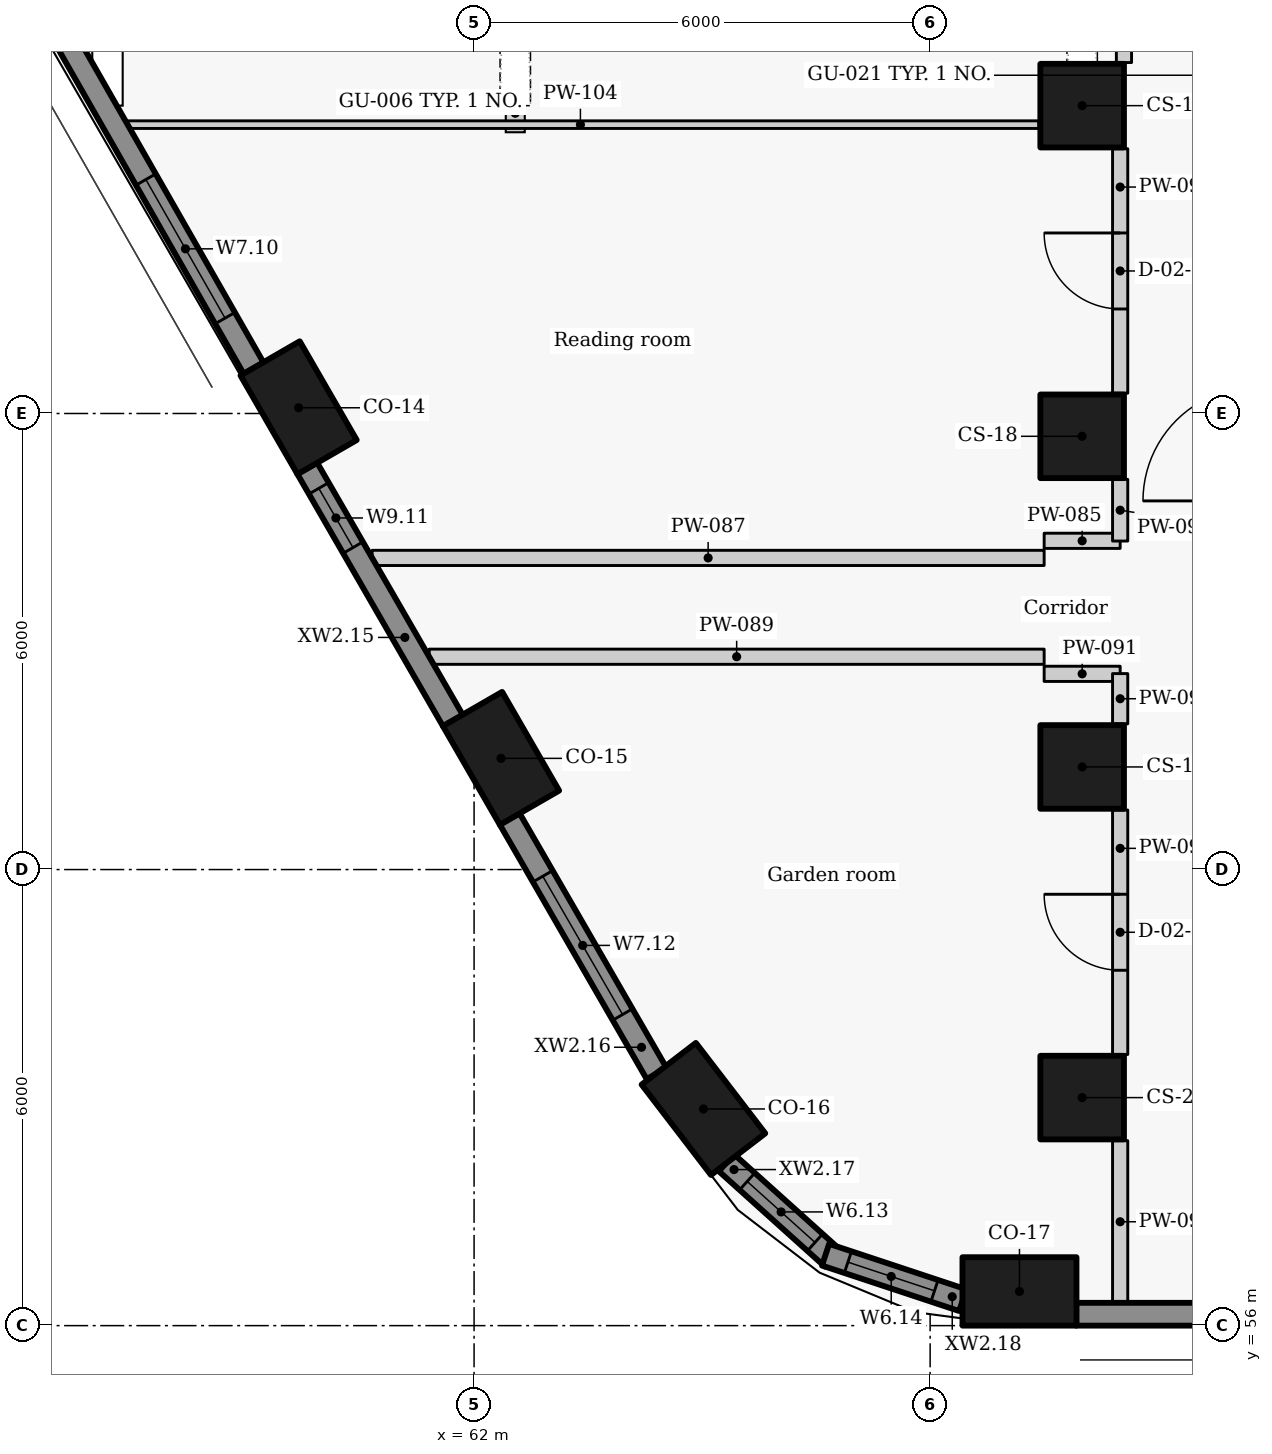
"""IFC4 building model, lengths in metres.
Left out: names, types, materials, properties, quantities, classifications, styles, units other than length and angle.
Written with IfcOpenShell. Run it as: python <this file> out.ifc"""

import sys

from ifc_helpers import new_model, si_unit, direction, frame, frame_2d, origin, origin_2d, place, context, subcontext, project, spatial, rectangle, extrude, element, fill, save


model = new_model("IFC4")
c1 = context("Model", 3, precision=1e-05, world=origin(), true_north=direction((0.0, 1.0)))
c2 = subcontext(c1, "Body", "Model", "MODEL_VIEW")
j1 = project(units=[si_unit("LENGTHUNIT", "METRE"), si_unit("PLANEANGLEUNIT", "RADIAN")], contexts=[c1])
p1 = place(None, origin())
s1 = spatial("IfcSite", under=j1, at=p1, CompositionType="ELEMENT")
p2 = place(p1, origin())
s2 = spatial("IfcBuilding", under=s1, at=p2, CompositionType="ELEMENT")
p3 = place(p2, frame((0.0, 0.0, 38.1)))
s3 = spatial("IfcBuildingStorey", under=s2, at=p3, CompositionType="ELEMENT", Elevation=38.1)
for number, where, z_axis, x_axis in (
    (1, (59.692, 68.075, 0.0), (0.0, 0.0, 1.0), (0.5, -0.866, 0.0)),
    (2, (62.354, 63.463, 0.0), (0.0, 0.0, 1.0), (0.5, -0.866, 0.0)),
    (3, (65.018, 58.851, 0.0), (0.0, 0.0, 1.0), (0.609, -0.793, 0.0)),
    (4, (69.175, 56.45, 0.0), (0.0, 0.0, 1.0), (1.0, 0.0, 0.0)),
):
    element("IfcColumn", number, at=place(p3, frame(where, z_axis=z_axis, x_axis=x_axis)), inside=s3, PredefinedType="COLUMN", context=c2, shape_type="SweptSolid", body=[
        extrude(rectangle(XDim=1.5, YDim=0.9, at=origin_2d()), origin(), (0.0, 0.0, 1.0), 3.3),
    ])
for number, where, z_axis, x_axis in (
    (5, (70.0, 72.05, 0.0), (0.0, 0.0, 1.0), (0.0, -1.0, 0.0)),
    (6, (70.0, 67.7, 0.0), (0.0, 0.0, 1.0), (0.0, -1.0, 0.0)),
    (7, (70.0, 63.35, 0.0), (0.0, 0.0, 1.0), (0.0, -1.0, 0.0)),
    (8, (70.0, 59.0, 0.0), (0.0, 0.0, 1.0), (0.0, -1.0, 0.0)),
):
    element("IfcColumn", number, at=place(p3, frame(where, z_axis=z_axis, x_axis=x_axis)), inside=s3, PredefinedType="COLUMN", context=c2, shape_type="SweptSolid", body=[
        extrude(rectangle(XDim=1.1, YDim=1.1, at=origin_2d()), origin(), (0.0, 0.0, 1.0), 3.3),
    ])
p4 = place(p3, frame((53.815, 77.848, 0.0), z_axis=(0.0, 0.0, 1.0), x_axis=(0.49599088679, -0.868327726277, 0.0)))
e9 = element("IfcWall", 9, at=p4, inside=s3, PredefinedType="SOLIDWALL", context=c2, shape_type="SweptSolid", body=[
    extrude(rectangle(XDim=10.656, YDim=0.3, at=frame_2d((5.328, 0.0))), origin(), (0.0, 0.0, 1.0), 2.425),
])
p5 = place(p4, frame((7.797, 0.0, 0.9)))
e10 = element("IfcOpeningElement", 10, at=p5, cuts=e9, PredefinedType="OPENING", context=c2, shape_type="SweptSolid", body=[
    extrude(rectangle(XDim=2.1, YDim=1.1, at=frame_2d((1.05, 0.55))), frame((0.0, 0.16, 0.0), z_axis=(0.0, -1.0, 0.0), x_axis=(1.0, 0.0, 0.0)), (0.0, 0.0, 1.0), 0.32),
])
p6 = place(p3, frame((59.805, 67.279, 0.0), z_axis=(0.0, 0.0, 1.0), x_axis=(0.500001735503, -0.866024401789, 0.0)))
e11 = element("IfcWall", 11, at=p6, inside=s3, PredefinedType="SOLIDWALL", context=c2, shape_type="SweptSolid", body=[
    extrude(rectangle(XDim=3.834, YDim=0.3, at=frame_2d((1.917, 0.0))), origin(), (0.0, 0.0, 1.0), 2.425),
])
p7 = place(p6, frame((0.305, 0.0, 0.9)))
e12 = element("IfcOpeningElement", 12, at=p7, cuts=e11, PredefinedType="OPENING", context=c2, shape_type="SweptSolid", body=[
    extrude(rectangle(XDim=0.9, YDim=1.1, at=frame_2d((0.45, 0.55))), frame((0.0, 0.16, 0.0), z_axis=(0.0, -1.0, 0.0), x_axis=(1.0, 0.0, 0.0)), (0.0, 0.0, 1.0), 0.32),
])
p8 = place(p3, frame((62.468, 62.667, 0.0), z_axis=(0.0, 0.0, 1.0), x_axis=(0.499948341072, -0.866055227026, 0.0)))
e13 = element("IfcWall", 13, at=p8, inside=s3, PredefinedType="SOLIDWALL", context=c2, shape_type="SweptSolid", body=[
    extrude(rectangle(XDim=3.867, YDim=0.3, at=frame_2d((1.934, 0.0))), origin(), (0.0, 0.0, 1.0), 2.425),
])
p9 = place(p8, frame((0.872, 0.0, 0.9)))
e14 = element("IfcOpeningElement", 14, at=p9, cuts=e13, PredefinedType="OPENING", context=c2, shape_type="SweptSolid", body=[
    extrude(rectangle(XDim=2.1, YDim=1.1, at=frame_2d((1.05, 0.55))), frame((0.0, 0.16, 0.0), z_axis=(0.0, -1.0, 0.0), x_axis=(1.0, 0.0, 0.0)), (0.0, 0.0, 1.0), 0.32),
])
p10 = place(p3, frame((65.32, 58.143, 0.0), z_axis=(0.0, 0.0, 1.0), x_axis=(0.7435526378, -0.668677407141, 0.0)))
e15 = element("IfcWall", 15, at=p10, inside=s3, PredefinedType="SOLIDWALL", context=c2, shape_type="SweptSolid", body=[
    extrude(rectangle(XDim=1.878, YDim=0.3, at=frame_2d((0.939, 0.0))), origin(), (0.0, 0.0, 1.0), 2.425),
])
p11 = place(p10, frame((0.367, 0.0, 0.9)))
e16 = element("IfcOpeningElement", 16, at=p11, cuts=e15, PredefinedType="OPENING", context=c2, shape_type="SweptSolid", body=[
    extrude(rectangle(XDim=1.2, YDim=1.1, at=frame_2d((0.6, 0.55))), frame((0.0, 0.16, 0.0), z_axis=(0.0, -1.0, 0.0), x_axis=(1.0, 0.0, 0.0)), (0.0, 0.0, 1.0), 0.32),
])
p12 = place(p3, frame((66.624, 56.933, 0.0), z_axis=(0.0, 0.0, 1.0), x_axis=(0.949246659442, -0.314532636683, 0.0)))
e17 = element("IfcWall", 17, at=p12, inside=s3, PredefinedType="SOLIDWALL", context=c2, shape_type="SweptSolid", body=[
    extrude(rectangle(XDim=1.902, YDim=0.3, at=frame_2d((0.951, 0.0))), origin(), (0.0, 0.0, 1.0), 2.425),
])
p13 = place(p12, frame((0.31, 0.0, 0.9)))
e18 = element("IfcOpeningElement", 18, at=p13, cuts=e17, PredefinedType="OPENING", context=c2, shape_type="SweptSolid", body=[
    extrude(rectangle(XDim=1.2, YDim=1.1, at=frame_2d((0.6, 0.55))), frame((0.0, 0.16, 0.0), z_axis=(0.0, -1.0, 0.0), x_axis=(1.0, 0.0, 0.0)), (0.0, 0.0, 1.0), 0.32),
])
p14 = place(p3, frame((69.921, 56.15, 0.0), z_axis=(0.0, 0.0, 1.0), x_axis=(1.0, 0.0, 0.0)))
e19 = element("IfcWall", 19, at=p14, inside=s3, PredefinedType="SOLIDWALL", context=c2, shape_type="SweptSolid", body=[
    extrude(rectangle(XDim=19.84, YDim=0.3, at=frame_2d((9.92, 0.0))), origin(), (0.0, 0.0, 1.0), 2.425),
])
p15 = place(p3, frame((69.5, 66.325, 0.0), z_axis=(0.0, 0.0, 1.0), x_axis=(1.0, 0.0, 0.0)))
e20 = element("IfcWall", 20, at=p15, inside=s3, PredefinedType="PARTITIONING", context=c2, shape_type="SweptSolid", body=[
    extrude(rectangle(XDim=1.0, YDim=0.2, at=frame_2d((0.5, 0.0))), origin(), (0.0, 0.0, 1.0), 2.505),
])
p16 = place(p3, frame((60.659, 66.1, 0.0), z_axis=(0.0, 0.0, 1.0), x_axis=(1.0, 0.0, 0.0)))
e21 = element("IfcWall", 21, at=p16, inside=s3, PredefinedType="PARTITIONING", context=c2, shape_type="SweptSolid", body=[
    extrude(rectangle(XDim=8.841, YDim=0.2, at=frame_2d((4.421, 0.0))), origin(), (0.0, 0.0, 1.0), 2.405),
])
p17 = place(p3, frame((61.409, 64.8, 0.0), z_axis=(0.0, 0.0, 1.0), x_axis=(1.0, 0.0, 0.0)))
e22 = element("IfcWall", 22, at=p17, inside=s3, PredefinedType="PARTITIONING", context=c2, shape_type="SweptSolid", body=[
    extrude(rectangle(XDim=8.091, YDim=0.2, at=frame_2d((4.045, 0.0))), origin(), (0.0, 0.0, 1.0), 2.405),
])
p18 = place(p3, frame((69.5, 64.575, 0.0), z_axis=(0.0, 0.0, 1.0), x_axis=(1.0, 0.0, 0.0)))
e23 = element("IfcWall", 23, at=p18, inside=s3, PredefinedType="PARTITIONING", context=c2, shape_type="SweptSolid", body=[
    extrude(rectangle(XDim=1.0, YDim=0.2, at=frame_2d((0.5, 0.0))), origin(), (0.0, 0.0, 1.0), 2.505),
])
p19 = place(p3, frame((70.5, 56.3, 0.0), z_axis=(0.0, 0.0, 1.0), x_axis=(0.0, 1.0, 0.0)))
e24 = element("IfcWall", 24, at=p19, inside=s3, PredefinedType="PARTITIONING", context=c2, shape_type="SweptSolid", body=[
    extrude(rectangle(XDim=2.133, YDim=0.2, at=frame_2d((1.066, 0.0))), origin(), (0.0, 0.0, 1.0), 3.025),
])
p20 = place(p3, frame((70.5, 59.567, 0.0), z_axis=(0.0, 0.0, 1.0), x_axis=(0.0, 1.0, 0.0)))
e25 = element("IfcWall", 25, at=p20, inside=s3, PredefinedType="PARTITIONING", context=c2, shape_type="SweptSolid", body=[
    extrude(rectangle(XDim=3.216, YDim=0.2, at=frame_2d((1.608, 0.0))), origin(), (0.0, 0.0, 1.0), 3.025),
])
p21 = place(p20, frame((1.108, 0.0, 0.0)))
e26 = element("IfcOpeningElement", 26, at=p21, cuts=e25, PredefinedType="OPENING", context=c2, shape_type="SweptSolid", body=[
    extrude(rectangle(XDim=1.0, YDim=2.1, at=frame_2d((0.5, 1.05))), frame((0.0, 0.11, 0.0), z_axis=(0.0, -1.0, 0.0), x_axis=(1.0, 0.0, 0.0)), (0.0, 0.0, 1.0), 0.22),
])
p22 = place(p3, frame((70.5, 63.917, 0.0), z_axis=(0.0, 0.0, 1.0), x_axis=(0.0, 1.0, 0.0)))
e27 = element("IfcWall", 27, at=p22, inside=s3, PredefinedType="PARTITIONING", context=c2, shape_type="SweptSolid", body=[
    extrude(rectangle(XDim=0.661, YDim=0.2, at=frame_2d((0.331, 0.0))), origin(), (0.0, 0.0, 1.0), 3.025),
])
p23 = place(p3, frame((70.5, 66.322, 0.0), z_axis=(0.0, 0.0, 1.0), x_axis=(0.0, 1.0, 0.0)))
e28 = element("IfcWall", 28, at=p23, inside=s3, PredefinedType="PARTITIONING", context=c2, shape_type="SweptSolid", body=[
    extrude(rectangle(XDim=0.811, YDim=0.2, at=frame_2d((0.406, 0.0))), origin(), (0.0, 0.0, 1.0), 3.025),
])
p24 = place(p3, frame((70.5, 68.267, 0.0), z_axis=(0.0, 0.0, 1.0), x_axis=(0.0, 1.0, 0.0)))
e29 = element("IfcWall", 29, at=p24, inside=s3, PredefinedType="PARTITIONING", context=c2, shape_type="SweptSolid", body=[
    extrude(rectangle(XDim=3.216, YDim=0.2, at=frame_2d((1.608, 0.0))), origin(), (0.0, 0.0, 1.0), 3.025),
])
p25 = place(p24, frame((1.108, 0.0, 0.0)))
e30 = element("IfcOpeningElement", 30, at=p25, cuts=e29, PredefinedType="OPENING", context=c2, shape_type="SweptSolid", body=[
    extrude(rectangle(XDim=1.0, YDim=2.1, at=frame_2d((0.5, 1.05))), frame((0.0, 0.11, 0.0), z_axis=(0.0, -1.0, 0.0), x_axis=(1.0, 0.0, 0.0)), (0.0, 0.0, 1.0), 0.22),
])
p26 = place(p3, frame((70.55, 72.617, 0.0), z_axis=(0.0, 0.0, 1.0), x_axis=(0.0, 1.0, 0.0)))
e31 = element("IfcWall", 31, at=p26, inside=s3, PredefinedType="PARTITIONING", context=c2, shape_type="SweptSolid", body=[
    extrude(rectangle(XDim=14.766, YDim=0.2, at=frame_2d((7.383, 0.0))), origin(), (0.0, 0.0, 1.0), 3.025),
])
p27 = place(p26, frame((9.575, 0.0, 0.0)))
e32 = element("IfcOpeningElement", 32, at=p27, cuts=e31, PredefinedType="OPENING", context=c2, shape_type="SweptSolid", body=[
    extrude(rectangle(XDim=1.0, YDim=2.1, at=frame_2d((0.5, 1.05))), frame((0.0, 0.11, 0.0), z_axis=(0.0, -1.0, 0.0), x_axis=(1.0, 0.0, 0.0)), (0.0, 0.0, 1.0), 0.22),
])
p28 = place(p26, frame((4.258, 0.0, 0.0)))
e33 = element("IfcOpeningElement", 33, at=p28, cuts=e31, PredefinedType="OPENING", context=c2, shape_type="SweptSolid", body=[
    extrude(rectangle(XDim=1.0, YDim=2.1, at=frame_2d((0.5, 1.05))), frame((0.0, 0.11, 0.0), z_axis=(0.0, -1.0, 0.0), x_axis=(1.0, 0.0, 0.0)), (0.0, 0.0, 1.0), 0.22),
])
p29 = place(p3, frame((57.368, 71.8, 0.0), z_axis=(0.0, 0.0, 1.0), x_axis=(1.0, 0.0, 0.0)))
e34 = element("IfcWall", 34, at=p29, inside=s3, PredefinedType="PARTITIONING", context=c2, shape_type="SweptSolid", body=[
    extrude(rectangle(XDim=12.062, YDim=0.1, at=frame_2d((6.031, 0.0))), origin(), (0.0, 0.0, 1.0), 2.405),
])
p30 = place(p5, origin())
e35 = element("IfcWindow", 35, at=p30, inside=s3, PartitioningType="SINGLE_PANEL", PredefinedType="WINDOW", context=c2, shape_type="SweptSolid", body=[
    extrude(rectangle(XDim=2.1, YDim=1.1, at=frame_2d((1.05, 0.55))), frame((0.0, 0.03, 0.0), z_axis=(0.0, -1.0, 0.0), x_axis=(1.0, 0.0, 0.0)), (0.0, 0.0, 1.0), 0.06),
])
fill(e10, e35)
p31 = place(p7, origin())
e36 = element("IfcWindow", 36, at=p31, inside=s3, PartitioningType="SINGLE_PANEL", PredefinedType="WINDOW", context=c2, shape_type="SweptSolid", body=[
    extrude(rectangle(XDim=0.9, YDim=1.1, at=frame_2d((0.45, 0.55))), frame((0.0, 0.03, 0.0), z_axis=(0.0, -1.0, 0.0), x_axis=(1.0, 0.0, 0.0)), (0.0, 0.0, 1.0), 0.06),
])
fill(e12, e36)
p32 = place(p9, origin())
e37 = element("IfcWindow", 37, at=p32, inside=s3, PartitioningType="SINGLE_PANEL", PredefinedType="WINDOW", context=c2, shape_type="SweptSolid", body=[
    extrude(rectangle(XDim=2.1, YDim=1.1, at=frame_2d((1.05, 0.55))), frame((0.0, 0.03, 0.0), z_axis=(0.0, -1.0, 0.0), x_axis=(1.0, 0.0, 0.0)), (0.0, 0.0, 1.0), 0.06),
])
fill(e14, e37)
p33 = place(p11, origin())
e38 = element("IfcWindow", 38, at=p33, inside=s3, PartitioningType="SINGLE_PANEL", PredefinedType="WINDOW", context=c2, shape_type="SweptSolid", body=[
    extrude(rectangle(XDim=1.2, YDim=1.1, at=frame_2d((0.6, 0.55))), frame((0.0, 0.03, 0.0), z_axis=(0.0, -1.0, 0.0), x_axis=(1.0, 0.0, 0.0)), (0.0, 0.0, 1.0), 0.06),
])
fill(e16, e38)
p34 = place(p13, origin())
e39 = element("IfcWindow", 39, at=p34, inside=s3, PartitioningType="SINGLE_PANEL", PredefinedType="WINDOW", context=c2, shape_type="SweptSolid", body=[
    extrude(rectangle(XDim=1.2, YDim=1.1, at=frame_2d((0.6, 0.55))), frame((0.0, 0.03, 0.0), z_axis=(0.0, -1.0, 0.0), x_axis=(1.0, 0.0, 0.0)), (0.0, 0.0, 1.0), 0.06),
])
fill(e18, e39)
p35 = place(p25, origin())
e40 = element("IfcDoor", 40, at=p35, inside=s3, OperationType="SINGLE_SWING_RIGHT", PredefinedType="DOOR", context=c2, shape_type="SweptSolid", body=[
    extrude(rectangle(XDim=1.0, YDim=2.1, at=frame_2d((0.5, 1.05))), frame((0.0, 0.025, 0.0), z_axis=(0.0, -1.0, 0.0), x_axis=(1.0, 0.0, 0.0)), (0.0, 0.0, 1.0), 0.05),
])
fill(e30, e40)
p36 = place(p21, origin())
e41 = element("IfcDoor", 41, at=p36, inside=s3, OperationType="SINGLE_SWING_RIGHT", PredefinedType="DOOR", context=c2, shape_type="SweptSolid", body=[
    extrude(rectangle(XDim=1.0, YDim=2.1, at=frame_2d((0.5, 1.05))), frame((0.0, 0.025, 0.0), z_axis=(0.0, -1.0, 0.0), x_axis=(1.0, 0.0, 0.0)), (0.0, 0.0, 1.0), 0.05),
])
fill(e26, e41)
save(model, sys.argv[1])
